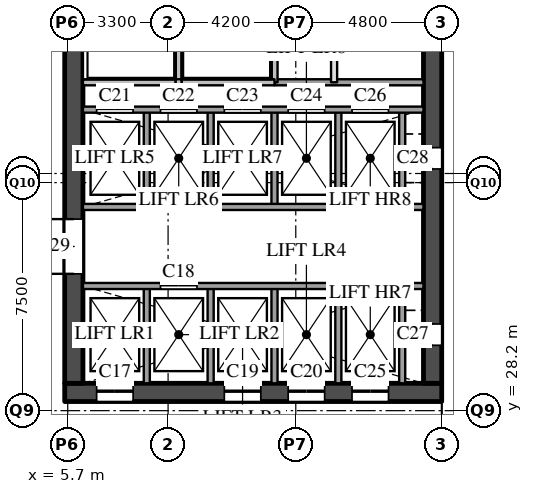
"""IFC4 building model, lengths in metres.
Left out: names, types, materials, properties, quantities, classifications, styles, units other than length and angle.
Written with IfcOpenShell. Run it as: python <this file> out.ifc"""

import sys

from ifc_helpers import new_model, si_unit, direction, frame, frame_2d, origin, place, context, subcontext, project, spatial, rectangle, extrude, element, fill, save


model = new_model("IFC4")
c1 = context("Model", 3, precision=1e-05, world=origin(), true_north=direction((0.0, 1.0)))
c2 = subcontext(c1, "Body", "Model", "MODEL_VIEW")
j1 = project(units=[si_unit("LENGTHUNIT", "METRE"), si_unit("PLANEANGLEUNIT", "RADIAN")], contexts=[c1])
p1 = place(None, origin())
s1 = spatial("IfcSite", under=j1, at=p1, CompositionType="ELEMENT")
p2 = place(p1, origin())
s2 = spatial("IfcBuilding", under=s1, at=p2, CompositionType="ELEMENT")
p3 = place(p2, origin())
s3 = spatial("IfcBuildingStorey", under=s2, at=p3, CompositionType="ELEMENT", Elevation=0.0)
p4 = place(p3, frame((5.6, 28.8, 0.0), z_axis=(0.0, 0.0, 1.0), x_axis=(1.0, 0.0, 0.0)))
e1 = element("IfcWall", 1, at=p4, inside=s3, PredefinedType="SHEAR", context=c2, shape_type="SweptSolid", body=[
    extrude(rectangle(XDim=12.4, YDim=0.6, at=frame_2d((6.2, 0.0))), origin(), (0.0, 0.0, 1.0), 7.59),
])
p5 = place(p4, frame((1.05, 0.0, 0.0)))
e2 = element("IfcOpeningElement", 2, at=p5, cuts=e1, PredefinedType="OPENING", context=c2, shape_type="SweptSolid", body=[
    extrude(rectangle(XDim=1.2, YDim=2.1, at=frame_2d((0.6, 1.05))), frame((0.0, 0.31, 0.0), z_axis=(0.0, -1.0, 0.0), x_axis=(1.0, 0.0, 0.0)), (0.0, 0.0, 1.0), 0.62),
])
p6 = place(p4, frame((5.25, 0.0, 0.0)))
e3 = element("IfcOpeningElement", 3, at=p6, cuts=e1, PredefinedType="OPENING", context=c2, shape_type="SweptSolid", body=[
    extrude(rectangle(XDim=1.2, YDim=2.1, at=frame_2d((0.6, 1.05))), frame((0.0, 0.31, 0.0), z_axis=(0.0, -1.0, 0.0), x_axis=(1.0, 0.0, 0.0)), (0.0, 0.0, 1.0), 0.62),
])
p7 = place(p4, frame((7.35, 0.0, 0.0)))
e4 = element("IfcOpeningElement", 4, at=p7, cuts=e1, PredefinedType="OPENING", context=c2, shape_type="SweptSolid", body=[
    extrude(rectangle(XDim=1.2, YDim=2.1, at=frame_2d((0.6, 1.05))), frame((0.0, 0.31, 0.0), z_axis=(0.0, -1.0, 0.0), x_axis=(1.0, 0.0, 0.0)), (0.0, 0.0, 1.0), 0.62),
])
p8 = place(p4, frame((9.45, 0.0, 0.0)))
e5 = element("IfcOpeningElement", 5, at=p8, cuts=e1, PredefinedType="OPENING", context=c2, shape_type="SweptSolid", body=[
    extrude(rectangle(XDim=1.2, YDim=2.1, at=frame_2d((0.6, 1.05))), frame((0.0, 0.31, 0.0), z_axis=(0.0, -1.0, 0.0), x_axis=(1.0, 0.0, 0.0)), (0.0, 0.0, 1.0), 0.62),
])
p9 = place(p3, frame((5.9, 29.1, 0.0), z_axis=(0.0, 0.0, 1.0), x_axis=(0.0, 1.0, 0.0)))
e6 = element("IfcWall", 6, at=p9, inside=s3, PredefinedType="SHEAR", context=c2, shape_type="SweptSolid", body=[
    extrude(rectangle(XDim=20.3, YDim=0.6, at=frame_2d((10.15, 0.0))), origin(), (0.0, 0.0, 1.0), 7.59),
])
p10 = place(p9, frame((3.6, 0.0, 0.0)))
e7 = element("IfcOpeningElement", 7, at=p10, cuts=e6, PredefinedType="OPENING", context=c2, shape_type="SweptSolid", body=[
    extrude(rectangle(XDim=1.8, YDim=2.1, at=frame_2d((0.9, 1.05))), frame((0.0, 0.31, 0.0), z_axis=(0.0, -1.0, 0.0), x_axis=(1.0, 0.0, 0.0)), (0.0, 0.0, 1.0), 0.62),
])
p11 = place(p9, frame((17.1, 0.0, 0.0)))
e8 = element("IfcOpeningElement", 8, at=p11, cuts=e6, PredefinedType="OPENING", context=c2, shape_type="SweptSolid", body=[
    extrude(rectangle(XDim=1.8, YDim=2.1, at=frame_2d((0.9, 1.05))), frame((0.0, 0.31, 0.0), z_axis=(0.0, -1.0, 0.0), x_axis=(1.0, 0.0, 0.0)), (0.0, 0.0, 1.0), 0.62),
])
p12 = place(p3, frame((17.7, 29.1, 0.0), z_axis=(0.0, 0.0, 1.0), x_axis=(0.0, 1.0, 0.0)))
e9 = element("IfcWall", 9, at=p12, inside=s3, PredefinedType="SHEAR", context=c2, shape_type="SweptSolid", body=[
    extrude(rectangle(XDim=20.3, YDim=0.6, at=frame_2d((10.15, 0.0))), origin(), (0.0, 0.0, 1.0), 7.59),
])
p13 = place(p12, frame((1.25, 0.0, 0.0)))
e10 = element("IfcOpeningElement", 10, at=p13, cuts=e9, PredefinedType="OPENING", context=c2, shape_type="SweptSolid", body=[
    extrude(rectangle(XDim=0.7, YDim=2.1, at=frame_2d((0.35, 1.05))), frame((0.0, 0.31, 0.0), z_axis=(0.0, -1.0, 0.0), x_axis=(1.0, 0.0, 0.0)), (0.0, 0.0, 1.0), 0.62),
])
p14 = place(p12, frame((7.05, 0.0, 0.0)))
e11 = element("IfcOpeningElement", 11, at=p14, cuts=e9, PredefinedType="OPENING", context=c2, shape_type="SweptSolid", body=[
    extrude(rectangle(XDim=0.7, YDim=2.1, at=frame_2d((0.35, 1.05))), frame((0.0, 0.31, 0.0), z_axis=(0.0, -1.0, 0.0), x_axis=(1.0, 0.0, 0.0)), (0.0, 0.0, 1.0), 0.62),
])
p15 = place(p12, frame((17.95, 0.0, 0.0), z_axis=(0.0, 0.0, 1.0), x_axis=(-1.0, 0.0, 0.0)))
e12 = element("IfcOpeningElement", 12, at=p15, cuts=e9, PredefinedType="OPENING", context=c2, shape_type="SweptSolid", body=[
    extrude(rectangle(XDim=1.8, YDim=2.4, at=frame_2d((0.9, 1.2))), frame((0.0, 0.31, 0.0), z_axis=(0.0, -1.0, 0.0), x_axis=(1.0, 0.0, 0.0)), (0.0, 0.0, 1.0), 0.62),
])
p16 = place(p12, frame((19.85, 0.0, 0.0), z_axis=(0.0, 0.0, 1.0), x_axis=(-1.0, 0.0, 0.0)))
e13 = element("IfcOpeningElement", 13, at=p16, cuts=e9, PredefinedType="OPENING", context=c2, shape_type="SweptSolid", body=[
    extrude(rectangle(XDim=1.8, YDim=2.4, at=frame_2d((0.9, 1.2))), frame((0.0, 0.31, 0.0), z_axis=(0.0, -1.0, 0.0), x_axis=(1.0, 0.0, 0.0)), (0.0, 0.0, 1.0), 0.62),
])
p17 = place(p3, frame((8.3, 29.1, 0.0), z_axis=(0.0, 0.0, 1.0), x_axis=(0.0, 1.0, 0.0)))
e14 = element("IfcWall", 14, at=p17, inside=s3, PredefinedType="SOLIDWALL", context=c2, shape_type="SweptSolid", body=[
    extrude(rectangle(XDim=3.2, YDim=0.2, at=frame_2d((1.6, 0.0))), origin(), (0.0, 0.0, 1.0), 7.59),
])
p18 = place(p3, frame((8.3, 34.9, 0.0), z_axis=(0.0, 0.0, 1.0), x_axis=(0.0, 1.0, 0.0)))
e15 = element("IfcWall", 15, at=p18, inside=s3, PredefinedType="SOLIDWALL", context=c2, shape_type="SweptSolid", body=[
    extrude(rectangle(XDim=3.2, YDim=0.2, at=frame_2d((1.6, 0.0))), origin(), (0.0, 0.0, 1.0), 7.59),
])
p19 = place(p3, frame((9.35, 39.0, 0.0), z_axis=(0.0, 0.0, 1.0), x_axis=(0.0, 1.0, 0.0)))
e16 = element("IfcWall", 16, at=p19, inside=s3, PredefinedType="SOLIDWALL", context=c2, shape_type="SweptSolid", body=[
    extrude(rectangle(XDim=1.62, YDim=0.2, at=frame_2d((0.81, 0.0))), origin(), (0.0, 0.0, 1.0), 7.59),
])
p20 = place(p3, frame((10.4, 29.1, 0.0), z_axis=(0.0, 0.0, 1.0), x_axis=(0.0, 1.0, 0.0)))
e17 = element("IfcWall", 17, at=p20, inside=s3, PredefinedType="SOLIDWALL", context=c2, shape_type="SweptSolid", body=[
    extrude(rectangle(XDim=3.2, YDim=0.2, at=frame_2d((1.6, 0.0))), origin(), (0.0, 0.0, 1.0), 7.59),
])
p21 = place(p3, frame((10.4, 34.9, 0.0), z_axis=(0.0, 0.0, 1.0), x_axis=(0.0, 1.0, 0.0)))
e18 = element("IfcWall", 18, at=p21, inside=s3, PredefinedType="SOLIDWALL", context=c2, shape_type="SweptSolid", body=[
    extrude(rectangle(XDim=3.2, YDim=0.2, at=frame_2d((1.6, 0.0))), origin(), (0.0, 0.0, 1.0), 7.59),
])
p22 = place(p3, frame((12.5, 29.1, 0.0), z_axis=(0.0, 0.0, 1.0), x_axis=(0.0, 1.0, 0.0)))
e19 = element("IfcWall", 19, at=p22, inside=s3, PredefinedType="SOLIDWALL", context=c2, shape_type="SweptSolid", body=[
    extrude(rectangle(XDim=3.2, YDim=0.2, at=frame_2d((1.6, 0.0))), origin(), (0.0, 0.0, 1.0), 7.59),
])
p23 = place(p3, frame((12.5, 34.9, 0.0), z_axis=(0.0, 0.0, 1.0), x_axis=(0.0, 1.0, 0.0)))
e20 = element("IfcWall", 20, at=p23, inside=s3, PredefinedType="SOLIDWALL", context=c2, shape_type="SweptSolid", body=[
    extrude(rectangle(XDim=3.2, YDim=0.2, at=frame_2d((1.6, 0.0))), origin(), (0.0, 0.0, 1.0), 7.59),
])
p24 = place(p3, frame((12.5, 39.0, 0.0), z_axis=(0.0, 0.0, 1.0), x_axis=(0.0, 1.0, 0.0)))
e21 = element("IfcWall", 21, at=p24, inside=s3, PredefinedType="SOLIDWALL", context=c2, shape_type="SweptSolid", body=[
    extrude(rectangle(XDim=1.62, YDim=0.2, at=frame_2d((0.81, 0.0))), origin(), (0.0, 0.0, 1.0), 7.59),
])
p25 = place(p3, frame((14.46, 39.0, 0.0), z_axis=(0.0, 0.0, 1.0), x_axis=(0.0, 1.0, 0.0)))
e22 = element("IfcWall", 22, at=p25, inside=s3, PredefinedType="PARTITIONING", context=c2, shape_type="SweptSolid", body=[
    extrude(rectangle(XDim=6.2, YDim=0.2, at=frame_2d((3.1, 0.0))), origin(), (0.0, 0.0, 1.0), 7.59),
])
p26 = place(p3, frame((14.6, 29.1, 0.0), z_axis=(0.0, 0.0, 1.0), x_axis=(0.0, 1.0, 0.0)))
e23 = element("IfcWall", 23, at=p26, inside=s3, PredefinedType="SOLIDWALL", context=c2, shape_type="SweptSolid", body=[
    extrude(rectangle(XDim=3.2, YDim=0.2, at=frame_2d((1.6, 0.0))), origin(), (0.0, 0.0, 1.0), 7.59),
])
p27 = place(p3, frame((14.6, 34.9, 0.0), z_axis=(0.0, 0.0, 1.0), x_axis=(0.0, 1.0, 0.0)))
e24 = element("IfcWall", 24, at=p27, inside=s3, PredefinedType="SOLIDWALL", context=c2, shape_type="SweptSolid", body=[
    extrude(rectangle(XDim=3.2, YDim=0.2, at=frame_2d((1.6, 0.0))), origin(), (0.0, 0.0, 1.0), 7.59),
])
p28 = place(p3, frame((16.7, 29.1, 0.0), z_axis=(0.0, 0.0, 1.0), x_axis=(0.0, 1.0, 0.0)))
e25 = element("IfcWall", 25, at=p28, inside=s3, PredefinedType="SOLIDWALL", context=c2, shape_type="SweptSolid", body=[
    extrude(rectangle(XDim=3.2, YDim=0.2, at=frame_2d((1.6, 0.0))), origin(), (0.0, 0.0, 1.0), 7.59),
])
p29 = place(p3, frame((16.7, 34.9, 0.0), z_axis=(0.0, 0.0, 1.0), x_axis=(0.0, 1.0, 0.0)))
e26 = element("IfcWall", 26, at=p29, inside=s3, PredefinedType="SOLIDWALL", context=c2, shape_type="SweptSolid", body=[
    extrude(rectangle(XDim=3.2, YDim=0.2, at=frame_2d((1.6, 0.0))), origin(), (0.0, 0.0, 1.0), 7.59),
])
p30 = place(p3, frame((6.2, 32.3, 0.0), z_axis=(0.0, 0.0, 1.0), x_axis=(1.0, 0.0, 0.0)))
e27 = element("IfcWall", 27, at=p30, inside=s3, PredefinedType="SOLIDWALL", context=c2, shape_type="SweptSolid", body=[
    extrude(rectangle(XDim=11.2, YDim=0.2, at=frame_2d((5.6, 0.0))), origin(), (0.0, 0.0, 1.0), 7.59),
])
p31 = place(p30, frame((2.55, 0.0, 0.0)))
e28 = element("IfcOpeningElement", 28, at=p31, cuts=e27, PredefinedType="OPENING", context=c2, shape_type="SweptSolid", body=[
    extrude(rectangle(XDim=1.2, YDim=2.1, at=frame_2d((0.6, 1.05))), frame((0.0, 0.11, 0.0), z_axis=(0.0, -1.0, 0.0), x_axis=(1.0, 0.0, 0.0)), (0.0, 0.0, 1.0), 0.22),
])
p32 = place(p3, frame((6.2, 34.9, 0.0), z_axis=(0.0, 0.0, 1.0), x_axis=(1.0, 0.0, 0.0)))
e29 = element("IfcWall", 29, at=p32, inside=s3, PredefinedType="SOLIDWALL", context=c2, shape_type="SweptSolid", body=[
    extrude(rectangle(XDim=11.2, YDim=0.2, at=frame_2d((5.6, 0.0))), origin(), (0.0, 0.0, 1.0), 7.59),
])
p33 = place(p3, frame((6.2, 38.1, 0.0), z_axis=(0.0, 0.0, 1.0), x_axis=(1.0, 0.0, 0.0)))
e30 = element("IfcWall", 30, at=p33, inside=s3, PredefinedType="SOLIDWALL", context=c2, shape_type="SweptSolid", body=[
    extrude(rectangle(XDim=11.2, YDim=0.2, at=frame_2d((5.6, 0.0))), origin(), (0.0, 0.0, 1.0), 7.59),
])
p34 = place(p33, frame((0.45, 0.0, 0.0)))
e31 = element("IfcOpeningElement", 31, at=p34, cuts=e30, PredefinedType="OPENING", context=c2, shape_type="SweptSolid", body=[
    extrude(rectangle(XDim=1.2, YDim=2.1, at=frame_2d((0.6, 1.05))), frame((0.0, 0.11, 0.0), z_axis=(0.0, -1.0, 0.0), x_axis=(1.0, 0.0, 0.0)), (0.0, 0.0, 1.0), 0.22),
])
p35 = place(p33, frame((2.55, 0.0, 0.0)))
e32 = element("IfcOpeningElement", 32, at=p35, cuts=e30, PredefinedType="OPENING", context=c2, shape_type="SweptSolid", body=[
    extrude(rectangle(XDim=1.2, YDim=2.1, at=frame_2d((0.6, 1.05))), frame((0.0, 0.11, 0.0), z_axis=(0.0, -1.0, 0.0), x_axis=(1.0, 0.0, 0.0)), (0.0, 0.0, 1.0), 0.22),
])
p36 = place(p33, frame((4.65, 0.0, 0.0)))
e33 = element("IfcOpeningElement", 33, at=p36, cuts=e30, PredefinedType="OPENING", context=c2, shape_type="SweptSolid", body=[
    extrude(rectangle(XDim=1.2, YDim=2.1, at=frame_2d((0.6, 1.05))), frame((0.0, 0.11, 0.0), z_axis=(0.0, -1.0, 0.0), x_axis=(1.0, 0.0, 0.0)), (0.0, 0.0, 1.0), 0.22),
])
p37 = place(p33, frame((6.75, 0.0, 0.0)))
e34 = element("IfcOpeningElement", 34, at=p37, cuts=e30, PredefinedType="OPENING", context=c2, shape_type="SweptSolid", body=[
    extrude(rectangle(XDim=1.2, YDim=2.1, at=frame_2d((0.6, 1.05))), frame((0.0, 0.11, 0.0), z_axis=(0.0, -1.0, 0.0), x_axis=(1.0, 0.0, 0.0)), (0.0, 0.0, 1.0), 0.22),
])
p38 = place(p33, frame((8.85, 0.0, 0.0)))
e35 = element("IfcOpeningElement", 35, at=p38, cuts=e30, PredefinedType="OPENING", context=c2, shape_type="SweptSolid", body=[
    extrude(rectangle(XDim=1.2, YDim=2.1, at=frame_2d((0.6, 1.05))), frame((0.0, 0.11, 0.0), z_axis=(0.0, -1.0, 0.0), x_axis=(1.0, 0.0, 0.0)), (0.0, 0.0, 1.0), 0.22),
])
p39 = place(p3, frame((12.5, 39.0, 0.0), z_axis=(0.0, 0.0, 1.0), x_axis=(1.0, 0.0, 0.0)))
e36 = element("IfcWall", 36, at=p39, inside=s3, PredefinedType="SOLIDWALL", context=c2, shape_type="SweptSolid", body=[
    extrude(rectangle(XDim=4.9, YDim=0.2, at=frame_2d((2.45, 0.0))), origin(), (0.0, 0.0, 1.0), 7.59),
])
p40 = place(p3, frame((6.2, 39.0, 0.0), z_axis=(0.0, 0.0, 1.0), x_axis=(1.0, 0.0, 0.0)))
e37 = element("IfcWall", 37, at=p40, inside=s3, PredefinedType="SOLIDWALL", context=c2, shape_type="SweptSolid", body=[
    extrude(rectangle(XDim=3.05, YDim=0.2, at=frame_2d((1.525, 0.0))), origin(), (0.0, 0.0, 1.0), 7.59),
])
p41 = place(p3, frame((9.25, 39.0, 0.0), z_axis=(0.0, 0.0, 1.0), x_axis=(1.0, 0.0, 0.0)))
e38 = element("IfcWall", 38, at=p41, inside=s3, PredefinedType="SOLIDWALL", context=c2, shape_type="SweptSolid", body=[
    extrude(rectangle(XDim=0.2, YDim=0.2, at=frame_2d((0.1, 0.0))), origin(), (0.0, 0.0, 1.0), 7.59),
])
p42 = place(p3, frame((9.45, 39.0, 0.0), z_axis=(0.0, 0.0, 1.0), x_axis=(1.0, 0.0, 0.0)))
e39 = element("IfcWall", 39, at=p42, inside=s3, PredefinedType="SOLIDWALL", context=c2, shape_type="SweptSolid", body=[
    extrude(rectangle(XDim=3.05, YDim=0.2, at=frame_2d((1.525, 0.0))), origin(), (0.0, 0.0, 1.0), 7.59),
])
p43 = place(p5, origin())
e40 = element("IfcDoor", 40, at=p43, inside=s3, OperationType="SLIDING_TO_LEFT", PredefinedType="DOOR", context=c2, shape_type="SweptSolid", body=[
    extrude(rectangle(XDim=1.2, YDim=2.1, at=frame_2d((0.6, 1.05))), frame((0.0, 0.025, 0.0), z_axis=(0.0, -1.0, 0.0), x_axis=(1.0, 0.0, 0.0)), (0.0, 0.0, 1.0), 0.05),
])
fill(e2, e40)
p44 = place(p31, origin())
e41 = element("IfcDoor", 41, at=p44, inside=s3, OperationType="SLIDING_TO_LEFT", PredefinedType="DOOR", context=c2, shape_type="SweptSolid", body=[
    extrude(rectangle(XDim=1.2, YDim=2.1, at=frame_2d((0.6, 1.05))), frame((0.0, 0.025, 0.0), z_axis=(0.0, -1.0, 0.0), x_axis=(1.0, 0.0, 0.0)), (0.0, 0.0, 1.0), 0.05),
])
fill(e28, e41)
p45 = place(p6, origin())
e42 = element("IfcDoor", 42, at=p45, inside=s3, OperationType="SLIDING_TO_LEFT", PredefinedType="DOOR", context=c2, shape_type="SweptSolid", body=[
    extrude(rectangle(XDim=1.2, YDim=2.1, at=frame_2d((0.6, 1.05))), frame((0.0, 0.025, 0.0), z_axis=(0.0, -1.0, 0.0), x_axis=(1.0, 0.0, 0.0)), (0.0, 0.0, 1.0), 0.05),
])
fill(e3, e42)
p46 = place(p7, origin())
e43 = element("IfcDoor", 43, at=p46, inside=s3, OperationType="SLIDING_TO_LEFT", PredefinedType="DOOR", context=c2, shape_type="SweptSolid", body=[
    extrude(rectangle(XDim=1.2, YDim=2.1, at=frame_2d((0.6, 1.05))), frame((0.0, 0.025, 0.0), z_axis=(0.0, -1.0, 0.0), x_axis=(1.0, 0.0, 0.0)), (0.0, 0.0, 1.0), 0.05),
])
fill(e4, e43)
p47 = place(p34, origin())
e44 = element("IfcDoor", 44, at=p47, inside=s3, OperationType="SLIDING_TO_LEFT", PredefinedType="DOOR", context=c2, shape_type="SweptSolid", body=[
    extrude(rectangle(XDim=1.2, YDim=2.1, at=frame_2d((0.6, 1.05))), frame((0.0, 0.025, 0.0), z_axis=(0.0, -1.0, 0.0), x_axis=(1.0, 0.0, 0.0)), (0.0, 0.0, 1.0), 0.05),
])
fill(e31, e44)
p48 = place(p35, origin())
e45 = element("IfcDoor", 45, at=p48, inside=s3, OperationType="SLIDING_TO_LEFT", PredefinedType="DOOR", context=c2, shape_type="SweptSolid", body=[
    extrude(rectangle(XDim=1.2, YDim=2.1, at=frame_2d((0.6, 1.05))), frame((0.0, 0.025, 0.0), z_axis=(0.0, -1.0, 0.0), x_axis=(1.0, 0.0, 0.0)), (0.0, 0.0, 1.0), 0.05),
])
fill(e32, e45)
p49 = place(p36, origin())
e46 = element("IfcDoor", 46, at=p49, inside=s3, OperationType="SLIDING_TO_LEFT", PredefinedType="DOOR", context=c2, shape_type="SweptSolid", body=[
    extrude(rectangle(XDim=1.2, YDim=2.1, at=frame_2d((0.6, 1.05))), frame((0.0, 0.025, 0.0), z_axis=(0.0, -1.0, 0.0), x_axis=(1.0, 0.0, 0.0)), (0.0, 0.0, 1.0), 0.05),
])
fill(e33, e46)
p50 = place(p37, origin())
e47 = element("IfcDoor", 47, at=p50, inside=s3, OperationType="SLIDING_TO_LEFT", PredefinedType="DOOR", context=c2, shape_type="SweptSolid", body=[
    extrude(rectangle(XDim=1.2, YDim=2.1, at=frame_2d((0.6, 1.05))), frame((0.0, 0.025, 0.0), z_axis=(0.0, -1.0, 0.0), x_axis=(1.0, 0.0, 0.0)), (0.0, 0.0, 1.0), 0.05),
])
fill(e34, e47)
p51 = place(p8, origin())
e48 = element("IfcDoor", 48, at=p51, inside=s3, OperationType="SLIDING_TO_LEFT", PredefinedType="DOOR", context=c2, shape_type="SweptSolid", body=[
    extrude(rectangle(XDim=1.2, YDim=2.1, at=frame_2d((0.6, 1.05))), frame((0.0, 0.025, 0.0), z_axis=(0.0, -1.0, 0.0), x_axis=(1.0, 0.0, 0.0)), (0.0, 0.0, 1.0), 0.05),
])
fill(e5, e48)
p52 = place(p38, origin())
e49 = element("IfcDoor", 49, at=p52, inside=s3, OperationType="SLIDING_TO_LEFT", PredefinedType="DOOR", context=c2, shape_type="SweptSolid", body=[
    extrude(rectangle(XDim=1.2, YDim=2.1, at=frame_2d((0.6, 1.05))), frame((0.0, 0.025, 0.0), z_axis=(0.0, -1.0, 0.0), x_axis=(1.0, 0.0, 0.0)), (0.0, 0.0, 1.0), 0.05),
])
fill(e35, e49)
p53 = place(p13, origin())
e50 = element("IfcDoor", 50, at=p53, inside=s3, OperationType="SINGLE_SWING_LEFT", PredefinedType="DOOR", context=c2, shape_type="SweptSolid", body=[
    extrude(rectangle(XDim=0.7, YDim=2.1, at=frame_2d((0.35, 1.05))), frame((0.0, 0.025, 0.0), z_axis=(0.0, -1.0, 0.0), x_axis=(1.0, 0.0, 0.0)), (0.0, 0.0, 1.0), 0.05),
])
fill(e10, e50)
p54 = place(p14, origin())
e51 = element("IfcDoor", 51, at=p54, inside=s3, OperationType="SINGLE_SWING_LEFT", PredefinedType="DOOR", context=c2, shape_type="SweptSolid", body=[
    extrude(rectangle(XDim=0.7, YDim=2.1, at=frame_2d((0.35, 1.05))), frame((0.0, 0.025, 0.0), z_axis=(0.0, -1.0, 0.0), x_axis=(1.0, 0.0, 0.0)), (0.0, 0.0, 1.0), 0.05),
])
fill(e11, e51)
p55 = place(p10, origin())
e52 = element("IfcDoor", 52, at=p55, inside=s3, OperationType="DOUBLE_DOOR_SINGLE_SWING", PredefinedType="DOOR", context=c2, shape_type="SweptSolid", body=[
    extrude(rectangle(XDim=1.8, YDim=2.1, at=frame_2d((0.9, 1.05))), frame((0.0, 0.025, 0.0), z_axis=(0.0, -1.0, 0.0), x_axis=(1.0, 0.0, 0.0)), (0.0, 0.0, 1.0), 0.05),
])
fill(e7, e52)
save(model, sys.argv[1])
